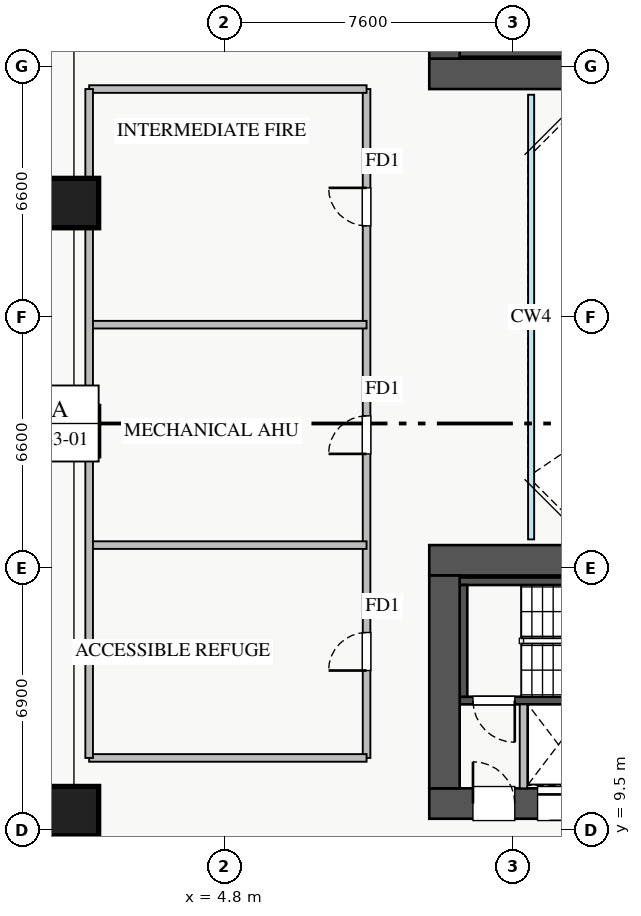
"""IFC4 building model, lengths in metres.
Left out: names, types, materials, properties, quantities, classifications, styles, units other than length and angle.
Written with IfcOpenShell. Run it as: python <this file> out.ifc"""

import sys

from ifc_helpers import new_model, si_unit, direction, frame, frame_2d, origin, origin_2d, place, context, subcontext, project, spatial, rectangle, extrude, source, transform, mapped, element, fill, save


model = new_model("IFC4")
c1 = context("Model", 3, precision=1e-05, world=origin(), true_north=direction((0.0, 1.0)))
c2 = subcontext(c1, "Body", "Model", "MODEL_VIEW")
j1 = project(units=[si_unit("LENGTHUNIT", "METRE"), si_unit("PLANEANGLEUNIT", "RADIAN")], contexts=[c1])
p1 = place(None, origin())
s1 = spatial("IfcSite", under=j1, at=p1, CompositionType="ELEMENT")
p2 = place(p1, origin())
s2 = spatial("IfcBuilding", under=s1, at=p2, CompositionType="ELEMENT")
p3 = place(p2, frame((0.0, 0.0, 92.5)))
s3 = spatial("IfcBuildingStorey", under=s2, at=p3, CompositionType="ELEMENT", Elevation=92.5)
p4 = place(p3, frame((12.68, 12.8, 0.0), z_axis=(0.0, 0.0, 1.0), x_axis=(1.0, 0.0, 0.0)))
e1 = element("IfcWall", 1, at=p4, inside=s3, PredefinedType="SHEAR", context=c2, shape_type="SweptSolid", body=[
    extrude(rectangle(XDim=1.94, YDim=0.18, at=frame_2d((0.97, 0.0))), origin(), (0.0, 0.0, 1.0), 4.32),
])
p5 = place(p3, frame((11.0, 29.95, 0.0), z_axis=(0.0, 0.0, 1.0), x_axis=(1.0, 0.0, 0.0)))
e2 = element("IfcWall", 2, at=p5, inside=s3, PredefinedType="SHEAR", context=c2, shape_type="SweptSolid", body=[
    extrude(rectangle(XDim=7.15, YDim=0.2, at=frame_2d((3.575, 0.0))), origin(), (0.0, 0.0, 1.0), 4.5),
])
p6 = place(p3, frame((11.0, 12.91, 0.0), z_axis=(0.0, 0.0, 1.0), x_axis=(1.0, 0.0, 0.0)))
e3 = element("IfcWall", 3, at=p6, inside=s3, PredefinedType="SHEAR", context=c2, shape_type="SweptSolid", body=[
    extrude(rectangle(XDim=7.15, YDim=0.2, at=frame_2d((3.575, 0.0))), origin(), (0.0, 0.0, 1.0), 4.5),
])
p7 = place(p6, frame((0.35, 0.0, 0.0)))
e4 = element("IfcOpeningElement", 4, at=p7, cuts=e3, PredefinedType="OPENING", context=c2, shape_type="SweptSolid", body=[
    extrude(rectangle(XDim=1.1, YDim=2.05, at=frame_2d((0.55, 1.025))), frame((0.0, 0.11, 0.0), z_axis=(0.0, -1.0, 0.0), x_axis=(1.0, 0.0, 0.0)), (0.0, 0.0, 1.0), 0.22),
])
p8 = place(p3, frame((11.0, 16.05, 0.0), z_axis=(0.0, 0.0, 1.0), x_axis=(1.0, 0.0, 0.0)))
e5 = element("IfcWall", 5, at=p8, inside=s3, PredefinedType="SHEAR", context=c2, shape_type="SweptSolid", body=[
    extrude(rectangle(XDim=7.15, YDim=0.2, at=frame_2d((3.575, 0.0))), origin(), (0.0, 0.0, 1.0), 4.5),
])
p9 = place(p3, frame((11.1, 13.01, 0.0), z_axis=(0.0, 0.0, 1.0), x_axis=(0.0, 1.0, 0.0)))
e6 = element("IfcWall", 6, at=p9, inside=s3, PredefinedType="SHEAR", context=c2, shape_type="SweptSolid", body=[
    extrude(rectangle(XDim=2.94, YDim=0.2, at=frame_2d((1.47, 0.0))), origin(), (0.0, 0.0, 1.0), 4.5),
])
p10 = place(p3, frame((10.2, 29.4, 0.0), z_axis=(0.0, 0.0, 1.0), x_axis=(1.0, 0.0, 0.0)))
e7 = element("IfcWall", 7, at=p10, inside=s3, PredefinedType="SHEAR", context=c2, shape_type="SweptSolid", body=[
    extrude(rectangle(XDim=17.6, YDim=0.8, at=frame_2d((8.8, 0.0))), origin(), (0.0, 0.0, 1.0), 4.5),
])
p11 = place(p3, frame((10.6, 29.8, 0.0), z_axis=(0.0, 0.0, 1.0), x_axis=(0.0, 1.0, 0.0)))
e8 = element("IfcWall", 8, at=p11, inside=s3, PredefinedType="SHEAR", context=c2, shape_type="SweptSolid", body=[
    extrude(rectangle(XDim=5.6, YDim=0.8, at=frame_2d((2.8, 0.0))), origin(), (0.0, 0.0, 1.0), 4.5),
])
p12 = place(p3, frame((10.2, 10.2, 0.0), z_axis=(0.0, 0.0, 1.0), x_axis=(1.0, 0.0, 0.0)))
e9 = element("IfcWall", 9, at=p12, inside=s3, PredefinedType="SHEAR", context=c2, shape_type="SweptSolid", body=[
    extrude(rectangle(XDim=17.6, YDim=0.8, at=frame_2d((8.8, 0.0))), origin(), (0.0, 0.0, 1.0), 4.5),
])
p13 = place(p12, frame((1.15, 0.0, 0.0)))
e10 = element("IfcOpeningElement", 10, at=p13, cuts=e9, PredefinedType="OPENING", context=c2, shape_type="SweptSolid", body=[
    extrude(rectangle(XDim=1.1, YDim=2.05, at=frame_2d((0.55, 1.025))), frame((0.0, 0.41, 0.0), z_axis=(0.0, -1.0, 0.0), x_axis=(1.0, 0.0, 0.0)), (0.0, 0.0, 1.0), 0.82),
])
p14 = place(p12, frame((8.3, 0.0, 0.0)))
e11 = element("IfcOpeningElement", 11, at=p14, cuts=e9, PredefinedType="OPENING", context=c2, shape_type="SweptSolid", body=[
    extrude(rectangle(XDim=1.1, YDim=2.05, at=frame_2d((0.55, 1.025))), frame((0.0, 0.41, 0.0), z_axis=(0.0, -1.0, 0.0), x_axis=(1.0, 0.0, 0.0)), (0.0, 0.0, 1.0), 0.82),
])
p15 = place(p12, frame((4.9, 0.0, 0.0)))
e12 = element("IfcOpeningElement", 12, at=p15, cuts=e9, PredefinedType="OPENING", context=c2, shape_type="SweptSolid", body=[
    extrude(rectangle(XDim=1.1, YDim=2.05, at=frame_2d((0.55, 1.025))), frame((0.0, 0.41, 0.0), z_axis=(0.0, -1.0, 0.0), x_axis=(1.0, 0.0, 0.0)), (0.0, 0.0, 1.0), 0.82),
])
p16 = place(p12, frame((2.85, 0.0, 0.0)))
e13 = element("IfcOpeningElement", 13, at=p16, cuts=e9, PredefinedType="OPENING", context=c2, shape_type="SweptSolid", body=[
    extrude(rectangle(XDim=1.1, YDim=2.05, at=frame_2d((0.55, 1.025))), frame((0.0, 0.41, 0.0), z_axis=(0.0, -1.0, 0.0), x_axis=(1.0, 0.0, 0.0)), (0.0, 0.0, 1.0), 0.82),
])
p17 = place(p12, frame((14.74, 0.0, 0.0)))
e14 = element("IfcOpeningElement", 14, at=p17, cuts=e9, PredefinedType="OPENING", context=c2, shape_type="SweptSolid", body=[
    extrude(rectangle(XDim=1.0, YDim=2.05, at=frame_2d((0.5, 1.025))), frame((0.0, 0.41, 0.0), z_axis=(0.0, -1.0, 0.0), x_axis=(1.0, 0.0, 0.0)), (0.0, 0.0, 1.0), 0.82),
])
p18 = place(p12, frame((11.835, 0.0, 0.0)))
e15 = element("IfcOpeningElement", 15, at=p18, cuts=e9, PredefinedType="OPENING", context=c2, shape_type="SweptSolid", body=[
    extrude(rectangle(XDim=1.0, YDim=2.05, at=frame_2d((0.5, 1.025))), frame((0.0, 0.41, 0.0), z_axis=(0.0, -1.0, 0.0), x_axis=(1.0, 0.0, 0.0)), (0.0, 0.0, 1.0), 0.82),
])
p19 = place(p12, frame((13.37, 0.0, 0.0)))
e16 = element("IfcOpeningElement", 16, at=p19, cuts=e9, PredefinedType="OPENING", context=c2, shape_type="SweptSolid", body=[
    extrude(rectangle(XDim=1.0, YDim=2.05, at=frame_2d((0.5, 1.025))), frame((0.0, 0.41, 0.0), z_axis=(0.0, -1.0, 0.0), x_axis=(1.0, 0.0, 0.0)), (0.0, 0.0, 1.0), 0.82),
])
p20 = place(p3, frame((10.2, 16.6, 0.0), z_axis=(0.0, 0.0, 1.0), x_axis=(1.0, 0.0, 0.0)))
e17 = element("IfcWall", 17, at=p20, inside=s3, PredefinedType="SHEAR", context=c2, shape_type="SweptSolid", body=[
    extrude(rectangle(XDim=17.6, YDim=0.8, at=frame_2d((8.8, 0.0))), origin(), (0.0, 0.0, 1.0), 4.5),
])
p21 = place(p3, frame((10.6, 10.6, 0.0), z_axis=(0.0, 0.0, 1.0), x_axis=(0.0, 1.0, 0.0)))
e18 = element("IfcWall", 18, at=p21, inside=s3, PredefinedType="SHEAR", context=c2, shape_type="SweptSolid", body=[
    extrude(rectangle(XDim=5.6, YDim=0.8, at=frame_2d((2.8, 0.0))), origin(), (0.0, 0.0, 1.0), 4.5),
])
m1 = source(origin(), c2, "Body", "SweptSolid", [
    extrude(rectangle(XDim=1.3, YDim=1.3, at=origin_2d()), origin(), (0.0, 0.0, 1.0), 4.5),
])
for number, where, z_axis, x_axis in (
    (19, (0.85, 26.0, 0.0), (0.0, 0.0, 1.0), (1.0, 0.0, 0.0)),
    (20, (0.85, 20.0, 0.0), (0.0, 0.0, 1.0), (1.0, 0.0, 0.0)),
    (21, (0.85, 10.0, 0.0), (0.0, 0.0, 1.0), (1.0, 0.0, 0.0)),
):
    element("IfcColumn", number, at=place(p3, frame(where, z_axis=z_axis, x_axis=x_axis)), inside=s3, PredefinedType="COLUMN", context=c2, shape_type="MappedRepresentation", body=[
        mapped(m1, transform((0.0, 0.0, 0.0), x_axis=(1.0, 0.0, 0.0), y_axis=(0.0, 1.0, 0.0), z_axis=(0.0, 0.0, 1.0), scale=1.0)),
    ])
p22 = place(p3, frame((12.68, 10.6, 0.0), z_axis=(0.0, 0.0, 1.0), x_axis=(0.0, 1.0, 0.0)))
e22 = element("IfcWall", 22, at=p22, inside=s3, PredefinedType="PARTITIONING", context=c2, shape_type="SweptSolid", body=[
    extrude(rectangle(XDim=2.21, YDim=0.2, at=frame_2d((1.105, 0.0))), origin(), (0.0, 0.0, 1.0), 4.32),
])
p23 = place(p3, frame((8.55, 11.4, 0.0), z_axis=(0.0, 0.0, 1.0), x_axis=(0.0, 1.0, 0.0)))
e23 = element("IfcWall", 23, at=p23, inside=s3, PredefinedType="PARTITIONING", context=c2, shape_type="SweptSolid", body=[
    extrude(rectangle(XDim=17.6, YDim=0.2, at=frame_2d((8.8, 0.0))), origin(), (0.0, 0.0, 1.0), 4.32),
])
p24 = place(p23, frame((8.0, 0.0, 0.0)))
e24 = element("IfcOpeningElement", 24, at=p24, cuts=e23, PredefinedType="OPENING", context=c2, shape_type="SweptSolid", body=[
    extrude(rectangle(XDim=1.0, YDim=2.05, at=frame_2d((0.5, 1.025))), frame((0.0, 0.11, 0.0), z_axis=(0.0, -1.0, 0.0), x_axis=(1.0, 0.0, 0.0)), (0.0, 0.0, 1.0), 0.22),
])
p25 = place(p23, frame((14.0, 0.0, 0.0)))
e25 = element("IfcOpeningElement", 25, at=p25, cuts=e23, PredefinedType="OPENING", context=c2, shape_type="SweptSolid", body=[
    extrude(rectangle(XDim=1.0, YDim=2.05, at=frame_2d((0.5, 1.025))), frame((0.0, 0.11, 0.0), z_axis=(0.0, -1.0, 0.0), x_axis=(1.0, 0.0, 0.0)), (0.0, 0.0, 1.0), 0.22),
])
p26 = place(p23, frame((2.3, 0.0, 0.0)))
e26 = element("IfcOpeningElement", 26, at=p26, cuts=e23, PredefinedType="OPENING", context=c2, shape_type="SweptSolid", body=[
    extrude(rectangle(XDim=1.0, YDim=2.05, at=frame_2d((0.5, 1.025))), frame((0.0, 0.11, 0.0), z_axis=(0.0, -1.0, 0.0), x_axis=(1.0, 0.0, 0.0)), (0.0, 0.0, 1.0), 0.22),
])
p27 = place(p3, frame((1.25, 11.4, 0.0), z_axis=(0.0, 0.0, 1.0), x_axis=(1.0, 0.0, 0.0)))
e27 = element("IfcWall", 27, at=p27, inside=s3, PredefinedType="PARTITIONING", context=c2, shape_type="SweptSolid", body=[
    extrude(rectangle(XDim=7.3, YDim=0.2, at=frame_2d((3.65, 0.0))), origin(), (0.0, 0.0, 1.0), 1.915),
])
for number, where, z_axis, x_axis in (
    (28, (1.25, 17.0, 0.0), (0.0, 0.0, 1.0), (1.0, 0.0, 0.0)),
    (29, (1.25, 22.8, 0.0), (0.0, 0.0, 1.0), (1.0, 0.0, 0.0)),
    (30, (1.25, 29.0, 0.0), (0.0, 0.0, 1.0), (1.0, 0.0, 0.0)),
):
    element("IfcWall", number, at=place(p3, frame(where, z_axis=z_axis, x_axis=x_axis)), inside=s3, PredefinedType="PARTITIONING", context=c2, shape_type="SweptSolid", body=[
        extrude(rectangle(XDim=7.3, YDim=0.2, at=frame_2d((3.65, 0.0))), origin(), (0.0, 0.0, 1.0), 4.32),
    ])
p28 = place(p3, frame((1.25, 11.4, 0.0), z_axis=(0.0, 0.0, 1.0), x_axis=(0.0, 1.0, 0.0)))
e31 = element("IfcWall", 31, at=p28, inside=s3, PredefinedType="PARTITIONING", context=c2, shape_type="SweptSolid", body=[
    extrude(rectangle(XDim=17.6, YDim=0.2, at=frame_2d((8.8, 0.0))), origin(), (0.0, 0.0, 1.0), 1.915),
])
m2 = source(origin(), c2, "Body", "SweptSolid", [
    extrude(rectangle(XDim=1.1, YDim=2.05, at=frame_2d((0.55, 1.025))), frame((0.0, 0.025, 0.0), z_axis=(0.0, -1.0, 0.0), x_axis=(1.0, 0.0, 0.0)), (0.0, 0.0, 1.0), 0.05),
])
p29 = place(p13, origin())
e32 = element("IfcDoor", 32, at=p29, inside=s3, OperationType="SINGLE_SWING_LEFT", PredefinedType="DOOR", context=c2, shape_type="MappedRepresentation", body=[
    mapped(m2, transform((0.0, 0.0, 0.0), x_axis=(1.0, 0.0, 0.0), y_axis=(0.0, 1.0, 0.0), z_axis=(0.0, 0.0, 1.0), scale=1.0)),
])
fill(e10, e32)
p30 = place(p7, frame((1.1, 0.0, 0.0), z_axis=(0.0, 0.0, 1.0), x_axis=(-1.0, 0.0, 0.0)))
e33 = element("IfcDoor", 33, at=p30, inside=s3, OperationType="SINGLE_SWING_RIGHT", PredefinedType="DOOR", context=c2, shape_type="MappedRepresentation", body=[
    mapped(m2, transform((0.0, 0.0, 0.0), x_axis=(1.0, 0.0, 0.0), y_axis=(0.0, 1.0, 0.0), z_axis=(0.0, 0.0, 1.0), scale=1.0)),
])
fill(e4, e33)
p31 = place(p16, origin())
e34 = element("IfcDoor", 34, at=p31, inside=s3, OperationType="SLIDING_TO_RIGHT", PredefinedType="DOOR", context=c2, shape_type="MappedRepresentation", body=[
    mapped(m2, transform((0.0, 0.0, 0.0), x_axis=(1.0, 0.0, 0.0), y_axis=(0.0, 1.0, 0.0), z_axis=(0.0, 0.0, 1.0), scale=1.0)),
])
fill(e13, e34)
m3 = source(origin(), c2, "Body", "SweptSolid", [
    extrude(rectangle(XDim=1.0, YDim=2.05, at=frame_2d((0.5, 1.025))), frame((0.0, 0.025, 0.0), z_axis=(0.0, -1.0, 0.0), x_axis=(1.0, 0.0, 0.0)), (0.0, 0.0, 1.0), 0.05),
])
p32 = place(p24, origin())
e35 = element("IfcDoor", 35, at=p32, inside=s3, OperationType="SINGLE_SWING_LEFT", PredefinedType="DOOR", context=c2, shape_type="MappedRepresentation", body=[
    mapped(m3, transform((0.0, 0.0, 0.0), x_axis=(1.0, 0.0, 0.0), y_axis=(0.0, 1.0, 0.0), z_axis=(0.0, 0.0, 1.0), scale=1.0)),
])
fill(e24, e35)
p33 = place(p25, origin())
e36 = element("IfcDoor", 36, at=p33, inside=s3, OperationType="SINGLE_SWING_RIGHT", PredefinedType="DOOR", context=c2, shape_type="MappedRepresentation", body=[
    mapped(m3, transform((0.0, 0.0, 0.0), x_axis=(1.0, 0.0, 0.0), y_axis=(0.0, 1.0, 0.0), z_axis=(0.0, 0.0, 1.0), scale=1.0)),
])
fill(e25, e36)
p34 = place(p26, origin())
e37 = element("IfcDoor", 37, at=p34, inside=s3, OperationType="SINGLE_SWING_LEFT", PredefinedType="DOOR", context=c2, shape_type="MappedRepresentation", body=[
    mapped(m3, transform((0.0, 0.0, 0.0), x_axis=(1.0, 0.0, 0.0), y_axis=(0.0, 1.0, 0.0), z_axis=(0.0, 0.0, 1.0), scale=1.0)),
])
fill(e26, e37)
save(model, sys.argv[1])
